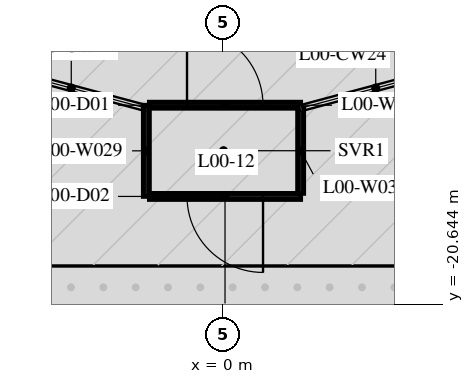
"""IFC4 building model, lengths in metres.
Left out: names, types, materials, properties, quantities, classifications, styles, units other than length and angle.
Written with IfcOpenShell. Run it as: python <this file> out.ifc"""

import sys

from ifc_helpers import new_model, si_unit, direction, frame, frame_2d, origin, place, context, subcontext, project, spatial, rectangle, extrude, element, fill, save


model = new_model("IFC4")
c1 = context("Model", 3, precision=1e-05, world=origin(), true_north=direction((0.0, 1.0)))
c2 = subcontext(c1, "Body", "Model", "MODEL_VIEW")
j1 = project(units=[si_unit("LENGTHUNIT", "METRE"), si_unit("PLANEANGLEUNIT", "RADIAN")], contexts=[c1])
p1 = place(None, origin())
s1 = spatial("IfcSite", under=j1, at=p1, CompositionType="ELEMENT")
p2 = place(p1, origin())
s2 = spatial("IfcBuilding", under=s1, at=p2, CompositionType="ELEMENT")
p3 = place(p2, origin())
s3 = spatial("IfcBuildingStorey", under=s2, at=p3, CompositionType="ELEMENT", Elevation=0.0)
p4 = place(p3, frame((-2.03, -17.8, 0.0), z_axis=(0.0, 0.0, 1.0), x_axis=(0.0, 1.0, 0.0)))
e1 = element("IfcWall", 1, at=p4, inside=s3, PredefinedType="PARTITIONING", context=c2, shape_type="SweptSolid", body=[
    extrude(rectangle(XDim=2.4, YDim=0.16, at=frame_2d((1.2, 0.0))), origin(), (0.0, 0.0, 1.0), 3.0),
])
p5 = place(p3, frame((-1.95, -15.4, 0.0), z_axis=(0.0, 0.0, 1.0), x_axis=(1.0, 0.0, 0.0)))
e2 = element("IfcWall", 2, at=p5, inside=s3, PredefinedType="PARTITIONING", context=c2, shape_type="SweptSolid", body=[
    extrude(rectangle(XDim=3.98, YDim=0.16, at=frame_2d((1.99, 0.0))), origin(), (0.0, 0.0, 1.0), 3.0),
])
p6 = place(p5, frame((0.99, 0.0, 0.0)))
e3 = element("IfcOpeningElement", 3, at=p6, cuts=e2, PredefinedType="OPENING", context=c2, shape_type="SweptSolid", body=[
    extrude(rectangle(XDim=2.0, YDim=2.4, at=frame_2d((1.0, 1.2))), frame((0.0, 0.09, 0.0), z_axis=(0.0, -1.0, 0.0), x_axis=(1.0, 0.0, 0.0)), (0.0, 0.0, 1.0), 0.18),
])
p7 = place(p3, frame((2.03, -17.8, 0.0), z_axis=(0.0, 0.0, 1.0), x_axis=(-1.0, 0.0, 0.0)))
e4 = element("IfcWall", 4, at=p7, inside=s3, PredefinedType="PARTITIONING", context=c2, shape_type="SweptSolid", body=[
    extrude(rectangle(XDim=3.98, YDim=0.16, at=frame_2d((1.99, 0.0))), origin(), (0.0, 0.0, 1.0), 3.0),
])
p8 = place(p7, frame((0.99, 0.0, 0.0)))
e5 = element("IfcOpeningElement", 5, at=p8, cuts=e4, PredefinedType="OPENING", context=c2, shape_type="SweptSolid", body=[
    extrude(rectangle(XDim=2.0, YDim=2.4, at=frame_2d((1.0, 1.2))), frame((0.0, 0.09, 0.0), z_axis=(0.0, -1.0, 0.0), x_axis=(1.0, 0.0, 0.0)), (0.0, 0.0, 1.0), 0.18),
])
p9 = place(p3, frame((2.03, -15.48, 0.0), z_axis=(0.0, 0.0, 1.0), x_axis=(0.0, -1.0, 0.0)))
e6 = element("IfcWall", 6, at=p9, inside=s3, PredefinedType="PARTITIONING", context=c2, shape_type="SweptSolid", body=[
    extrude(rectangle(XDim=2.24, YDim=0.16, at=frame_2d((1.12, 0.0))), origin(), (0.0, 0.0, 1.0), 3.0),
])
p10 = place(p6, origin())
e7 = element("IfcDoor", 7, at=p10, inside=s3, OperationType="DOUBLE_DOOR_SINGLE_SWING", PredefinedType="DOOR", context=c2, shape_type="SweptSolid", body=[
    extrude(rectangle(XDim=2.0, YDim=2.4, at=frame_2d((1.0, 1.2))), frame((0.0, 0.025, 0.0), z_axis=(0.0, -1.0, 0.0), x_axis=(1.0, 0.0, 0.0)), (0.0, 0.0, 1.0), 0.05),
])
fill(e3, e7)
p11 = place(p8, origin())
e8 = element("IfcDoor", 8, at=p11, inside=s3, OperationType="DOUBLE_DOOR_SINGLE_SWING", PredefinedType="DOOR", context=c2, shape_type="SweptSolid", body=[
    extrude(rectangle(XDim=2.0, YDim=2.4, at=frame_2d((1.0, 1.2))), frame((0.0, 0.025, 0.0), z_axis=(0.0, -1.0, 0.0), x_axis=(1.0, 0.0, 0.0)), (0.0, 0.0, 1.0), 0.05),
])
fill(e5, e8)
save(model, sys.argv[1])
